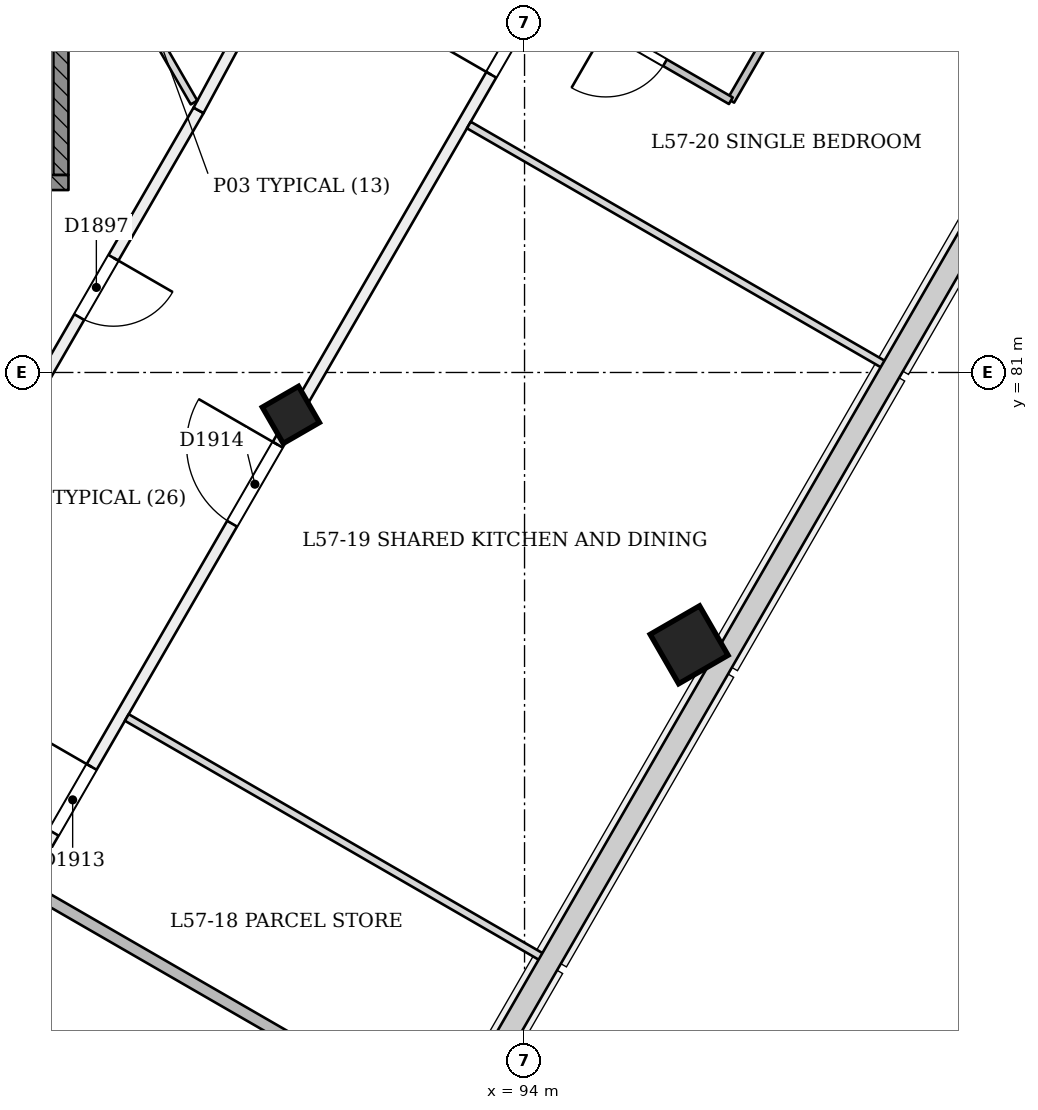
"""IFC4 building model, lengths in metres.
Left out: names, types, materials, properties, quantities, classifications, styles, units other than length and angle.
Written with IfcOpenShell. Run it as: python <this file> out.ifc"""

import sys

from ifc_helpers import new_model, si_unit, direction, frame, frame_2d, origin, origin_2d, place, context, subcontext, project, spatial, rectangle, extrude, element, fill, save


model = new_model("IFC4")
c1 = context("Model", 3, precision=1e-05, world=origin(), true_north=direction((0.0, 1.0)))
c2 = subcontext(c1, "Body", "Model", "MODEL_VIEW")
j1 = project(units=[si_unit("LENGTHUNIT", "METRE"), si_unit("PLANEANGLEUNIT", "RADIAN")], contexts=[c1])
p1 = place(None, origin())
s1 = spatial("IfcSite", under=j1, at=p1, CompositionType="ELEMENT")
p2 = place(p1, origin())
s2 = spatial("IfcBuilding", under=s1, at=p2, CompositionType="ELEMENT")
p3 = place(p2, frame((0.0, 0.0, 223.0)))
s3 = spatial("IfcBuildingStorey", under=s2, at=p3, CompositionType="ELEMENT", Elevation=223.0)
p4 = place(p3, frame((90.953, 80.395, -0.017), z_axis=(-0.022155133694, 0.038483534979, 0.999013597298), x_axis=(-0.501315604945, -0.864979598699, 0.022202659155)))
e1 = element("IfcColumn", 1, at=p4, inside=s3, PredefinedType="COLUMN", context=c2, shape_type="SweptSolid", body=[
    extrude(rectangle(XDim=0.55, YDim=0.55, at=origin_2d()), origin(), (0.0, 0.0, 1.0), 3.604),
])
p5 = place(p3, frame((96.192, 77.37, -0.023), z_axis=(-0.022222910879, 0.038415824599, 0.999014697916), x_axis=(-0.49951099421, -0.866023301278, 0.022190275058)))
e2 = element("IfcColumn", 2, at=p5, inside=s3, PredefinedType="COLUMN", context=c2, shape_type="SweptSolid", body=[
    extrude(rectangle(XDim=0.75, YDim=0.75, at=origin_2d()), origin(), (0.0, 0.0, 1.0), 3.604),
])
p6 = place(p3, frame((89.711, 84.449, 0.0), z_axis=(0.0, 0.0, 1.0), x_axis=(-0.499900351431, -0.866082928269, 0.0)))
e3 = element("IfcWall", 3, at=p6, inside=s3, PredefinedType="PARTITIONING", context=c2, shape_type="SweptSolid", body=[
    extrude(rectangle(XDim=9.425, YDim=0.15, at=frame_2d((4.712, 0.0))), origin(), (0.0, 0.0, 1.0), 3.2),
])
p7 = place(p6, frame((2.24, 0.0, 0.0)))
e4 = element("IfcOpeningElement", 4, at=p7, cuts=e3, PredefinedType="OPENING", context=c2, shape_type="SweptSolid", body=[
    extrude(rectangle(XDim=0.9, YDim=2.1, at=frame_2d((0.45, 1.05))), frame((0.0, 0.085, 0.0), z_axis=(0.0, -1.0, 0.0), x_axis=(1.0, 0.0, 0.0)), (0.0, 0.0, 1.0), 0.171),
])
p8 = place(p6, frame((5.996, 0.0, 0.0)))
e5 = element("IfcOpeningElement", 5, at=p8, cuts=e3, PredefinedType="OPENING", context=c2, shape_type="SweptSolid", body=[
    extrude(rectangle(XDim=1.0, YDim=2.1, at=frame_2d((0.5, 1.05))), frame((0.0, 0.085, 0.0), z_axis=(0.0, -1.0, 0.0), x_axis=(1.0, 0.0, 0.0)), (0.0, 0.0, 1.0), 0.171),
])
p9 = place(p3, frame((93.033, 90.6, 0.0), z_axis=(0.0, 0.0, 1.0), x_axis=(-0.475153240815, -0.87990306156, 0.0)))
e6 = element("IfcWall", 6, at=p9, inside=s3, PredefinedType="PARTITIONING", context=c2, shape_type="SweptSolid", body=[
    extrude(rectangle(XDim=6.991, YDim=0.15, at=frame_2d((3.496, 0.0))), origin(), (0.0, 0.0, 1.0), 3.2),
])
p10 = place(p9, frame((3.041, 0.0, 0.0)))
e7 = element("IfcOpeningElement", 7, at=p10, cuts=e6, PredefinedType="OPENING", context=c2, shape_type="SweptSolid", body=[
    extrude(rectangle(XDim=0.9, YDim=2.1, at=frame_2d((0.45, 1.05))), frame((0.0, 0.085, 0.0), z_axis=(0.0, -1.0, 0.0), x_axis=(1.0, 0.0, 0.0)), (0.0, 0.0, 1.0), 0.171),
])
p11 = place(p3, frame((85.0, 70.086, 0.0), z_axis=(0.0, 0.0, 1.0), x_axis=(0.500003316903, 0.866023488761, 0.0)))
e8 = element("IfcWall", 8, at=p11, inside=s3, PredefinedType="PARTITIONING", context=c2, shape_type="SweptSolid", body=[
    extrude(rectangle(XDim=23.225, YDim=0.15, at=frame_2d((11.613, 0.0))), origin(), (0.0, 0.0, 1.0), 2.8),
])
p12 = place(p11, frame((0.599, 0.0, 0.0)))
e9 = element("IfcOpeningElement", 9, at=p12, cuts=e8, PredefinedType="OPENING", context=c2, shape_type="SweptSolid", body=[
    extrude(rectangle(XDim=1.0, YDim=2.1, at=frame_2d((0.5, 1.05))), frame((0.0, 0.085, 0.0), z_axis=(0.0, -1.0, 0.0), x_axis=(1.0, 0.0, 0.0)), (0.0, 0.0, 1.0), 0.171),
])
p13 = place(p11, frame((3.36, 0.0, 0.0)))
e10 = element("IfcOpeningElement", 10, at=p13, cuts=e8, PredefinedType="OPENING", context=c2, shape_type="SweptSolid", body=[
    extrude(rectangle(XDim=1.0, YDim=2.1, at=frame_2d((0.5, 1.05))), frame((0.0, 0.085, 0.0), z_axis=(0.0, -1.0, 0.0), x_axis=(1.0, 0.0, 0.0)), (0.0, 0.0, 1.0), 0.171),
])
p14 = place(p11, frame((5.61, 0.0, 0.0)))
e11 = element("IfcOpeningElement", 11, at=p14, cuts=e8, PredefinedType="OPENING", context=c2, shape_type="SweptSolid", body=[
    extrude(rectangle(XDim=1.0, YDim=2.1, at=frame_2d((0.5, 1.05))), frame((0.0, 0.085, 0.0), z_axis=(0.0, -1.0, 0.0), x_axis=(1.0, 0.0, 0.0)), (0.0, 0.0, 1.0), 0.171),
])
p15 = place(p11, frame((10.305, 0.0, 0.0)))
e12 = element("IfcOpeningElement", 12, at=p15, cuts=e8, PredefinedType="OPENING", context=c2, shape_type="SweptSolid", body=[
    extrude(rectangle(XDim=1.2, YDim=2.1, at=frame_2d((0.6, 1.05))), frame((0.0, 0.085, 0.0), z_axis=(0.0, -1.0, 0.0), x_axis=(1.0, 0.0, 0.0)), (0.0, 0.0, 1.0), 0.171),
])
p16 = place(p11, frame((17.125, 0.0, 0.0)))
e13 = element("IfcOpeningElement", 13, at=p16, cuts=e8, PredefinedType="OPENING", context=c2, shape_type="SweptSolid", body=[
    extrude(rectangle(XDim=1.0, YDim=2.1, at=frame_2d((0.5, 1.05))), frame((0.0, 0.085, 0.0), z_axis=(0.0, -1.0, 0.0), x_axis=(1.0, 0.0, 0.0)), (0.0, 0.0, 1.0), 0.171),
])
p17 = place(p3, frame((89.652, 84.552, 0.0), z_axis=(0.0, 0.0, 1.0), x_axis=(-0.499993479487, 0.866029168372, 0.0)))
e14 = element("IfcWall", 14, at=p17, inside=s3, PredefinedType="PARTITIONING", context=c2, shape_type="SweptSolid", body=[
    extrude(rectangle(XDim=1.689, YDim=0.1, at=frame_2d((0.845, 0.0))), origin(), (0.0, 0.0, 1.0), 3.2),
])
p18 = place(p3, frame((91.995, 69.402, 0.0), z_axis=(0.0, 0.0, 1.0), x_axis=(-0.866015887322, 0.500016482634, 0.0)))
e15 = element("IfcWall", 15, at=p18, inside=s3, PredefinedType="PARTITIONING", context=c2, shape_type="SweptSolid", body=[
    extrude(rectangle(XDim=6.325, YDim=0.15, at=frame_2d((3.163, 0.0))), origin(), (0.0, 0.0, 1.0), 2.7),
])
p19 = place(p3, frame((92.967, 71.046, 0.0), z_axis=(0.0, 0.0, 1.0), x_axis=(-0.866032443377, 0.499987806871, 0.0)))
e16 = element("IfcWall", 16, at=p19, inside=s3, PredefinedType="PARTITIONING", context=c2, shape_type="SweptSolid", body=[
    extrude(rectangle(XDim=6.345, YDim=0.15, at=frame_2d((3.172, 0.0))), origin(), (0.0, 0.0, 1.0), 2.7),
])
for number, where, z_axis, x_axis in (
    (17, (94.262, 73.289, 0.0), (0.0, 0.0, 1.0), (-0.866, 0.5, 0.0)),
    (18, (98.762, 81.083, 0.0), (0.0, 0.0, 1.0), (-0.866, 0.5, 0.0)),
):
    element("IfcWall", number, at=place(p3, frame(where, z_axis=z_axis, x_axis=x_axis)), inside=s3, PredefinedType="PARTITIONING", context=c2, shape_type="SweptSolid", body=[
        extrude(rectangle(XDim=6.345, YDim=0.1, at=frame_2d((3.173, 0.0))), origin(), (0.0, 0.0, 1.0), 2.7),
    ])
p20 = place(p3, frame((97.964, 86.74, 0.0), z_axis=(0.0, 0.0, 1.0), x_axis=(-0.500004234368, -0.866022959057, 0.0)))
e19 = element("IfcWall", 19, at=p20, inside=s3, PredefinedType="PARTITIONING", context=c2, shape_type="SweptSolid", body=[
    extrude(rectangle(XDim=2.5, YDim=0.1, at=frame_2d((1.25, 0.0))), origin(), (0.0, 0.0, 1.0), 2.8),
])
p21 = place(p3, frame((96.714, 84.575, 0.0), z_axis=(0.0, 0.0, 1.0), x_axis=(-0.866048868473, 0.499959355765, 0.0)))
e20 = element("IfcWall", 20, at=p21, inside=s3, PredefinedType="PARTITIONING", context=c2, shape_type="SweptSolid", body=[
    extrude(rectangle(XDim=2.825, YDim=0.1, at=frame_2d((1.413, 0.0))), origin(), (0.0, 0.0, 1.0), 3.2),
])
p22 = place(p21, frame((1.0, 0.0, 0.0)))
e21 = element("IfcOpeningElement", 21, at=p22, cuts=e20, PredefinedType="OPENING", context=c2, shape_type="SweptSolid", body=[
    extrude(rectangle(XDim=0.9, YDim=2.1, at=frame_2d((0.45, 1.05))), frame((0.0, 0.061, 0.0), z_axis=(0.0, -1.0, 0.0), x_axis=(1.0, 0.0, 0.0)), (0.0, 0.0, 1.0), 0.121),
])
p23 = place(p3, frame((100.995, 84.99, 0.0), z_axis=(0.0, 0.0, 1.0), x_axis=(-0.866020560687, 0.500008388397, 0.0)))
e22 = element("IfcWall", 22, at=p23, inside=s3, PredefinedType="PARTITIONING", context=c2, shape_type="SweptSolid", body=[
    extrude(rectangle(XDim=3.4, YDim=0.15, at=frame_2d((1.7, 0.0))), origin(), (0.0, 0.0, 1.0), 2.7),
])
p24 = place(p3, frame((82.0, 83.5, 0.0), z_axis=(0.0, 0.0, 1.0), x_axis=(1.0, 0.0, 0.0)))
e23 = element("IfcWall", 23, at=p24, inside=s3, PredefinedType="SOLIDWALL", context=c2, shape_type="SweptSolid", body=[
    extrude(rectangle(XDim=6.0, YDim=0.2, at=frame_2d((3.0, 0.0))), origin(), (0.0, 0.0, 1.0), 3.2),
])
p25 = place(p3, frame((87.9, 83.6, 0.0), z_axis=(0.0, 0.0, 1.0), x_axis=(0.0, 1.0, 0.0)))
e24 = element("IfcWall", 24, at=p25, inside=s3, PredefinedType="SOLIDWALL", context=c2, shape_type="SweptSolid", body=[
    extrude(rectangle(XDim=6.8, YDim=0.2, at=frame_2d((3.4, 0.0))), origin(), (0.0, 0.0, 1.0), 3.2),
])
p26 = place(p7, origin())
e25 = element("IfcDoor", 25, at=p26, inside=s3, OperationType="SINGLE_SWING_LEFT", PredefinedType="NOTDEFINED", context=c2, shape_type="SweptSolid", body=[
    extrude(rectangle(XDim=0.9, YDim=2.1, at=frame_2d((0.45, 1.05))), frame((0.0, 0.025, 0.0), z_axis=(0.0, -1.0, 0.0), x_axis=(1.0, 0.0, 0.0)), (0.0, 0.0, 1.0), 0.05),
])
fill(e4, e25)
p27 = place(p14, origin())
e26 = element("IfcDoor", 26, at=p27, inside=s3, OperationType="SINGLE_SWING_RIGHT", PredefinedType="NOTDEFINED", context=c2, shape_type="SweptSolid", body=[
    extrude(rectangle(XDim=1.0, YDim=2.1, at=frame_2d((0.5, 1.05))), frame((0.0, 0.025, 0.0), z_axis=(0.0, -1.0, 0.0), x_axis=(1.0, 0.0, 0.0)), (0.0, 0.0, 1.0), 0.05),
])
fill(e11, e26)
p28 = place(p15, origin())
e27 = element("IfcDoor", 27, at=p28, inside=s3, OperationType="SINGLE_SWING_RIGHT", PredefinedType="NOTDEFINED", context=c2, shape_type="SweptSolid", body=[
    extrude(rectangle(XDim=1.2, YDim=2.1, at=frame_2d((0.6, 1.05))), frame((0.0, 0.025, 0.0), z_axis=(0.0, -1.0, 0.0), x_axis=(1.0, 0.0, 0.0)), (0.0, 0.0, 1.0), 0.05),
])
fill(e12, e27)
p29 = place(p16, origin())
e28 = element("IfcDoor", 28, at=p29, inside=s3, OperationType="SINGLE_SWING_LEFT", PredefinedType="NOTDEFINED", context=c2, shape_type="SweptSolid", body=[
    extrude(rectangle(XDim=1.0, YDim=2.1, at=frame_2d((0.5, 1.05))), frame((0.0, 0.025, 0.0), z_axis=(0.0, -1.0, 0.0), x_axis=(1.0, 0.0, 0.0)), (0.0, 0.0, 1.0), 0.05),
])
fill(e13, e28)
p30 = place(p22, origin())
e29 = element("IfcDoor", 29, at=p30, inside=s3, OperationType="SINGLE_SWING_RIGHT", PredefinedType="NOTDEFINED", context=c2, shape_type="SweptSolid", body=[
    extrude(rectangle(XDim=0.9, YDim=2.1, at=frame_2d((0.45, 1.05))), frame((0.0, 0.025, 0.0), z_axis=(0.0, -1.0, 0.0), x_axis=(1.0, 0.0, 0.0)), (0.0, 0.0, 1.0), 0.05),
])
fill(e21, e29)
save(model, sys.argv[1])
